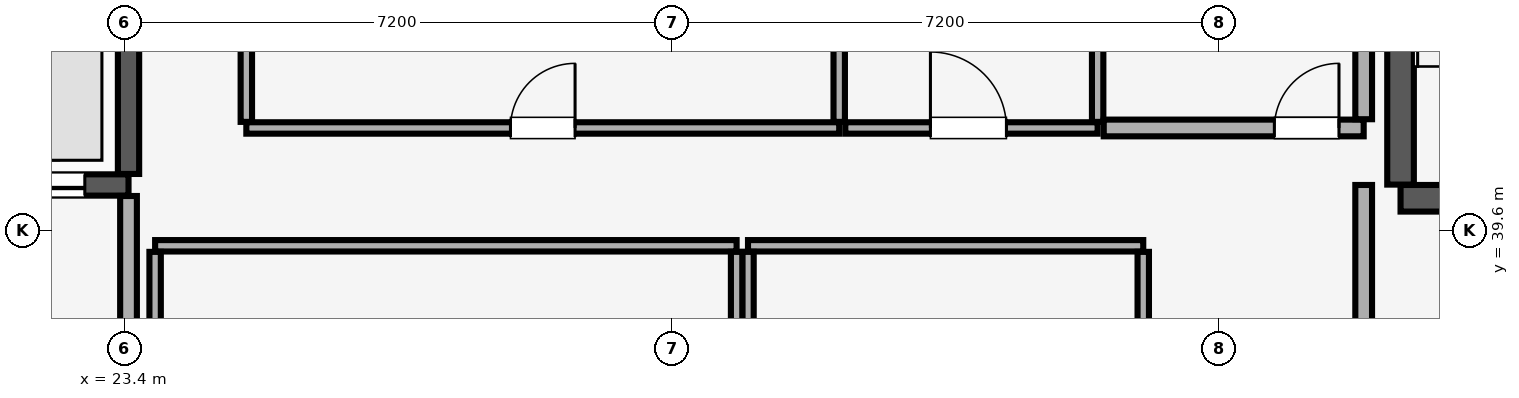
"""IFC4 building model, lengths in metres.
Left out: names, types, materials, properties, quantities, classifications, styles, units other than length and angle.
Written with IfcOpenShell. Run it as: python <this file> out.ifc"""

import sys

from ifc_helpers import new_model, si_unit, direction, frame, frame_2d, origin, place, context, subcontext, project, spatial, rectangle, extrude, element, fill, save


model = new_model("IFC4")
c1 = context("Model", 3, precision=1e-05, world=origin(), true_north=direction((0.0, 1.0)))
c2 = subcontext(c1, "Body", "Model", "MODEL_VIEW")
j1 = project(units=[si_unit("LENGTHUNIT", "METRE"), si_unit("PLANEANGLEUNIT", "RADIAN")], contexts=[c1])
p1 = place(None, origin())
s1 = spatial("IfcSite", under=j1, at=p1, CompositionType="ELEMENT")
p2 = place(p1, origin())
s2 = spatial("IfcBuilding", under=s1, at=p2, CompositionType="ELEMENT")
p3 = place(p2, frame((0.0, 0.0, 305.7)))
s3 = spatial("IfcBuildingStorey", under=s2, at=p3, CompositionType="ELEMENT", Elevation=305.7)
p4 = place(p3, frame((40.185, 40.025, 0.0), z_axis=(0.0, 0.0, 1.0), x_axis=(1.0, 0.0, 0.0)))
e1 = element("IfcWall", 1, at=p4, inside=s3, PredefinedType="SHEAR", context=c2, shape_type="SweptSolid", body=[
    extrude(rectangle(XDim=3.63, YDim=0.35, at=frame_2d((1.815, 0.0))), origin(), (0.0, 0.0, 1.0), 4.7),
])
p5 = place(p4, frame((1.24, 0.0, 0.0)))
e2 = element("IfcOpeningElement", 2, at=p5, cuts=e1, PredefinedType="OPENING", context=c2, shape_type="SweptSolid", body=[
    extrude(rectangle(XDim=1.15, YDim=2.15, at=frame_2d((0.575, 1.075))), frame((0.0, 0.185, 0.0), z_axis=(0.0, -1.0, 0.0), x_axis=(1.0, 0.0, 0.0)), (0.0, 0.0, 1.0), 0.37),
])
p6 = place(p3, frame((40.185, 40.205, 0.0), z_axis=(0.0, 0.0, 1.0), x_axis=(0.0, 1.0, 0.0)))
e3 = element("IfcWall", 3, at=p6, inside=s3, PredefinedType="SHEAR", context=c2, shape_type="SweptSolid", body=[
    extrude(rectangle(XDim=8.09, YDim=0.35, at=frame_2d((4.045, 0.0))), origin(), (0.0, 0.0, 1.0), 4.7),
])
p7 = place(p3, frame((21.035, 40.2, 0.0), z_axis=(0.0, 0.0, 1.0), x_axis=(1.0, 0.0, 0.0)))
e4 = element("IfcWall", 4, at=p7, inside=s3, PredefinedType="SHEAR", context=c2, shape_type="SweptSolid", body=[
    extrude(rectangle(XDim=2.415, YDim=0.28, at=frame_2d((1.208, 0.0))), origin(), (0.0, 0.0, 1.0), 4.7),
])
p8 = place(p7, frame((0.54, 0.0, 0.0)))
e5 = element("IfcOpeningElement", 5, at=p8, cuts=e4, PredefinedType="OPENING", context=c2, shape_type="SweptSolid", body=[
    extrude(rectangle(XDim=1.3, YDim=2.3, at=frame_2d((0.65, 1.15))), frame((0.0, 0.15, 0.0), z_axis=(0.0, -1.0, 0.0), x_axis=(1.0, 0.0, 0.0)), (0.0, 0.0, 1.0), 0.3),
])
p9 = place(p3, frame((23.45, 40.345, 0.0), z_axis=(0.0, 0.0, 1.0), x_axis=(0.0, 1.0, 0.0)))
e6 = element("IfcWall", 6, at=p9, inside=s3, PredefinedType="SHEAR", context=c2, shape_type="SweptSolid", body=[
    extrude(rectangle(XDim=2.81, YDim=0.28, at=frame_2d((1.405, 0.0))), origin(), (0.0, 0.0, 1.0), 4.7),
])
p10 = place(p3, frame((23.45, 34.415, 0.0), z_axis=(0.0, 0.0, 1.0), x_axis=(0.0, 1.0, 0.0)))
e7 = element("IfcWall", 7, at=p10, inside=s3, PredefinedType="PARTITIONING", context=c2, shape_type="SweptSolid", body=[
    extrude(rectangle(XDim=5.64, YDim=0.22, at=frame_2d((2.82, 0.0))), origin(), (0.0, 0.0, 1.0), 4.7),
])
p11 = place(p3, frame((39.7, 34.415, 0.0), z_axis=(0.0, 0.0, 1.0), x_axis=(0.0, 1.0, 0.0)))
e8 = element("IfcWall", 8, at=p11, inside=s3, PredefinedType="PARTITIONING", context=c2, shape_type="SweptSolid", body=[
    extrude(rectangle(XDim=5.785, YDim=0.22, at=frame_2d((2.893, 0.0))), origin(), (0.0, 0.0, 1.0), 4.7),
])
p12 = place(p3, frame((31.6, 39.4, 0.0), z_axis=(0.0, 0.0, 1.0), x_axis=(1.0, 0.0, 0.0)))
e9 = element("IfcWall", 9, at=p12, inside=s3, PredefinedType="PARTITIONING", context=c2, shape_type="SweptSolid", body=[
    extrude(rectangle(XDim=5.2, YDim=0.15, at=frame_2d((2.6, 0.0))), origin(), (0.0, 0.0, 1.0), 4.7),
])
for number, where, z_axis, x_axis in (
    (10, (31.6, 34.38, 0.0), (0.0, 0.0, 1.0), (0.0, 1.0, 0.0)),
    (11, (36.8, 34.38, 0.0), (0.0, 0.0, 1.0), (0.0, 1.0, 0.0)),
):
    element("IfcWall", number, at=place(p3, frame(where, z_axis=z_axis, x_axis=x_axis)), inside=s3, PredefinedType="PARTITIONING", context=c2, shape_type="SweptSolid", body=[
        extrude(rectangle(XDim=4.94, YDim=0.15, at=frame_2d((2.47, 0.0))), origin(), (0.0, 0.0, 1.0), 4.7),
    ])
p13 = place(p3, frame((23.8, 39.4, 0.0), z_axis=(0.0, 0.0, 1.0), x_axis=(1.0, 0.0, 0.0)))
e12 = element("IfcWall", 12, at=p13, inside=s3, PredefinedType="PARTITIONING", context=c2, shape_type="SweptSolid", body=[
    extrude(rectangle(XDim=7.65, YDim=0.15, at=frame_2d((3.825, 0.0))), origin(), (0.0, 0.0, 1.0), 4.7),
])
for number, where, z_axis, x_axis in (
    (13, (23.8, 34.38, 0.0), (0.0, 0.0, 1.0), (0.0, 1.0, 0.0)),
    (14, (31.45, 34.38, 0.0), (0.0, 0.0, 1.0), (0.0, 1.0, 0.0)),
):
    element("IfcWall", number, at=place(p3, frame(where, z_axis=z_axis, x_axis=x_axis)), inside=s3, PredefinedType="PARTITIONING", context=c2, shape_type="SweptSolid", body=[
        extrude(rectangle(XDim=4.94, YDim=0.15, at=frame_2d((2.47, 0.0))), origin(), (0.0, 0.0, 1.0), 4.7),
    ])
p14 = place(p3, frame((25.0, 40.95, 0.0), z_axis=(0.0, 0.0, 1.0), x_axis=(1.0, 0.0, 0.0)))
e15 = element("IfcWall", 15, at=p14, inside=s3, PredefinedType="PARTITIONING", context=c2, shape_type="SweptSolid", body=[
    extrude(rectangle(XDim=7.8, YDim=0.15, at=frame_2d((3.9, 0.0))), origin(), (0.0, 0.0, 1.0), 4.7),
])
p15 = place(p14, frame((3.475, 0.0, 0.0)))
e16 = element("IfcOpeningElement", 16, at=p15, cuts=e15, PredefinedType="OPENING", context=c2, shape_type="SweptSolid", body=[
    extrude(rectangle(XDim=0.85, YDim=2.1, at=frame_2d((0.425, 1.05))), frame((0.0, 0.085, 0.0), z_axis=(0.0, -1.0, 0.0), x_axis=(1.0, 0.0, 0.0)), (0.0, 0.0, 1.0), 0.17),
])
for number, where, z_axis, x_axis in (
    (17, (25.0, 41.03, 0.0), (0.0, 0.0, 1.0), (0.0, 1.0, 0.0)),
    (18, (32.8, 41.03, 0.0), (0.0, 0.0, 1.0), (0.0, 1.0, 0.0)),
):
    element("IfcWall", number, at=place(p3, frame(where, z_axis=z_axis, x_axis=x_axis)), inside=s3, PredefinedType="PARTITIONING", context=c2, shape_type="SweptSolid", body=[
        extrude(rectangle(XDim=7.82, YDim=0.15, at=frame_2d((3.91, 0.0))), origin(), (0.0, 0.0, 1.0), 4.7),
    ])
p16 = place(p3, frame((32.88, 40.95, 0.0), z_axis=(0.0, 0.0, 1.0), x_axis=(1.0, 0.0, 0.0)))
e19 = element("IfcWall", 19, at=p16, inside=s3, PredefinedType="PARTITIONING", context=c2, shape_type="SweptSolid", body=[
    extrude(rectangle(XDim=3.32, YDim=0.15, at=frame_2d((1.66, 0.0))), origin(), (0.0, 0.0, 1.0), 4.7),
])
p17 = place(p16, frame((1.12, 0.0, 0.0)))
e20 = element("IfcOpeningElement", 20, at=p17, cuts=e19, PredefinedType="OPENING", context=c2, shape_type="SweptSolid", body=[
    extrude(rectangle(XDim=1.0, YDim=2.15, at=frame_2d((0.5, 1.075))), frame((0.0, 0.085, 0.0), z_axis=(0.0, -1.0, 0.0), x_axis=(1.0, 0.0, 0.0)), (0.0, 0.0, 1.0), 0.17),
])
p18 = place(p3, frame((36.2, 41.03, 0.0), z_axis=(0.0, 0.0, 1.0), x_axis=(0.0, 1.0, 0.0)))
e21 = element("IfcWall", 21, at=p18, inside=s3, PredefinedType="PARTITIONING", context=c2, shape_type="SweptSolid", body=[
    extrude(rectangle(XDim=7.82, YDim=0.15, at=frame_2d((3.91, 0.0))), origin(), (0.0, 0.0, 1.0), 4.7),
])
p19 = place(p3, frame((36.28, 40.95, 0.0), z_axis=(0.0, 0.0, 1.0), x_axis=(1.0, 0.0, 0.0)))
e22 = element("IfcWall", 22, at=p19, inside=s3, PredefinedType="PARTITIONING", context=c2, shape_type="SweptSolid", body=[
    extrude(rectangle(XDim=3.42, YDim=0.22, at=frame_2d((1.71, 0.0))), origin(), (0.0, 0.0, 1.0), 4.7),
])
p20 = place(p19, frame((2.245, 0.0, 0.0)))
e23 = element("IfcOpeningElement", 23, at=p20, cuts=e22, PredefinedType="OPENING", context=c2, shape_type="SweptSolid", body=[
    extrude(rectangle(XDim=0.85, YDim=2.1, at=frame_2d((0.425, 1.05))), frame((0.0, 0.12, 0.0), z_axis=(0.0, -1.0, 0.0), x_axis=(1.0, 0.0, 0.0)), (0.0, 0.0, 1.0), 0.24),
])
p21 = place(p3, frame((39.7, 41.065, 0.0), z_axis=(0.0, 0.0, 1.0), x_axis=(0.0, 1.0, 0.0)))
e24 = element("IfcWall", 24, at=p21, inside=s3, PredefinedType="PARTITIONING", context=c2, shape_type="SweptSolid", body=[
    extrude(rectangle(XDim=7.785, YDim=0.22, at=frame_2d((3.893, 0.0))), origin(), (0.0, 0.0, 1.0), 4.7),
])
p22 = place(p8, origin())
e25 = element("IfcDoor", 25, at=p22, inside=s3, OperationType="DOUBLE_DOOR_SLIDING", PredefinedType="DOOR", context=c2, shape_type="SweptSolid", body=[
    extrude(rectangle(XDim=1.3, YDim=2.3, at=frame_2d((0.65, 1.15))), frame((0.0, 0.025, 0.0), z_axis=(0.0, -1.0, 0.0), x_axis=(1.0, 0.0, 0.0)), (0.0, 0.0, 1.0), 0.05),
])
fill(e5, e25)
p23 = place(p15, origin())
e26 = element("IfcDoor", 26, at=p23, inside=s3, OperationType="SINGLE_SWING_RIGHT", PredefinedType="DOOR", context=c2, shape_type="SweptSolid", body=[
    extrude(rectangle(XDim=0.85, YDim=2.1, at=frame_2d((0.425, 1.05))), frame((0.0, 0.025, 0.0), z_axis=(0.0, -1.0, 0.0), x_axis=(1.0, 0.0, 0.0)), (0.0, 0.0, 1.0), 0.05),
])
fill(e16, e26)
p24 = place(p17, origin())
e27 = element("IfcDoor", 27, at=p24, inside=s3, OperationType="SINGLE_SWING_LEFT", PredefinedType="DOOR", context=c2, shape_type="SweptSolid", body=[
    extrude(rectangle(XDim=1.0, YDim=2.15, at=frame_2d((0.5, 1.075))), frame((0.0, 0.025, 0.0), z_axis=(0.0, -1.0, 0.0), x_axis=(1.0, 0.0, 0.0)), (0.0, 0.0, 1.0), 0.05),
])
fill(e20, e27)
p25 = place(p20, origin())
e28 = element("IfcDoor", 28, at=p25, inside=s3, OperationType="SINGLE_SWING_RIGHT", PredefinedType="DOOR", context=c2, shape_type="SweptSolid", body=[
    extrude(rectangle(XDim=0.85, YDim=2.1, at=frame_2d((0.425, 1.05))), frame((0.0, 0.025, 0.0), z_axis=(0.0, -1.0, 0.0), x_axis=(1.0, 0.0, 0.0)), (0.0, 0.0, 1.0), 0.05),
])
fill(e23, e28)
save(model, sys.argv[1])
